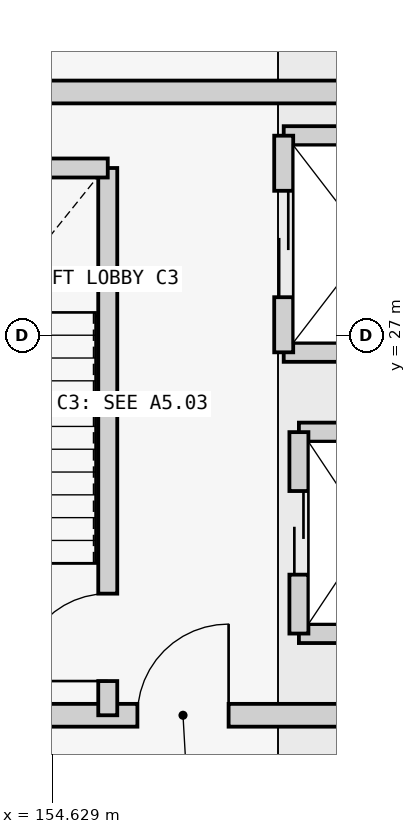
"""IFC4 building model, lengths in metres.
Left out: names, types, materials, properties, quantities, classifications, styles, units other than length and angle.
Written with IfcOpenShell. Run it as: python <this file> out.ifc"""

import sys

from ifc_helpers import new_model, si_unit, direction, frame, frame_2d, origin, place, context, subcontext, project, spatial, rectangle, extrude, element, fill, save


model = new_model("IFC4")
c1 = context("Model", 3, precision=1e-05, world=origin(), true_north=direction((0.0, 1.0)))
c2 = subcontext(c1, "Body", "Model", "MODEL_VIEW")
j1 = project(units=[si_unit("LENGTHUNIT", "METRE"), si_unit("PLANEANGLEUNIT", "RADIAN")], contexts=[c1])
p1 = place(None, origin())
s1 = spatial("IfcSite", under=j1, at=p1, CompositionType="ELEMENT")
p2 = place(p1, origin())
s2 = spatial("IfcBuilding", under=s1, at=p2, CompositionType="ELEMENT")
p3 = place(p2, frame((0.0, 0.0, 12.6)))
s3 = spatial("IfcBuildingStorey", under=s2, at=p3, CompositionType="ELEMENT", Elevation=12.6)
p4 = place(p3, frame((151.0, 22.0, 0.0), z_axis=(0.0, 0.0, 1.0), x_axis=(1.0, 0.0, 0.0)))
e1 = element("IfcWall", 1, at=p4, inside=s3, PredefinedType="SHEAR", context=c2, shape_type="SweptSolid", body=[
    extrude(rectangle(XDim=10.2, YDim=0.3, at=frame_2d((5.1, 0.0))), origin(), (0.0, 0.0, 1.0), 3.925),
])
p5 = place(p4, frame((4.75, 0.0, 0.0)))
e2 = element("IfcOpeningElement", 2, at=p5, cuts=e1, PredefinedType="OPENING", context=c2, shape_type="SweptSolid", body=[
    extrude(rectangle(XDim=1.2, YDim=2.15, at=frame_2d((0.6, 1.075))), frame((0.0, 0.16, 0.0), z_axis=(0.0, -1.0, 0.0), x_axis=(1.0, 0.0, 0.0)), (0.0, 0.0, 1.0), 0.32),
])
p6 = place(p3, frame((161.2, 30.2, 0.0), z_axis=(0.0, 0.0, 1.0), x_axis=(-1.0, 0.0, 0.0)))
e3 = element("IfcWall", 3, at=p6, inside=s3, PredefinedType="SHEAR", context=c2, shape_type="SweptSolid", body=[
    extrude(rectangle(XDim=10.2, YDim=0.3, at=frame_2d((5.1, 0.0))), origin(), (0.0, 0.0, 1.0), 3.925),
])
p7 = place(p3, frame((155.36, 22.0, 0.0), z_axis=(0.0, 0.0, 1.0), x_axis=(0.0, 1.0, 0.0)))
e4 = element("IfcWall", 4, at=p7, inside=s3, PredefinedType="SHEAR", context=c2, shape_type="SweptSolid", body=[
    extrude(rectangle(XDim=7.2, YDim=0.25, at=frame_2d((3.6, 0.0))), origin(), (0.0, 0.0, 1.0), 3.925),
])
p8 = place(p7, frame((0.45, 0.0, 0.0)))
e5 = element("IfcOpeningElement", 5, at=p8, cuts=e4, PredefinedType="OPENING", context=c2, shape_type="SweptSolid", body=[
    extrude(rectangle(XDim=1.15, YDim=2.15, at=frame_2d((0.575, 1.075))), frame((0.0, 0.135, 0.0), z_axis=(0.0, -1.0, 0.0), x_axis=(1.0, 0.0, 0.0)), (0.0, 0.0, 1.0), 0.27),
])
p9 = place(p3, frame((151.0, 29.2, 0.0), z_axis=(0.0, 0.0, 1.0), x_axis=(1.0, 0.0, 0.0)))
e6 = element("IfcWall", 6, at=p9, inside=s3, PredefinedType="SHEAR", context=c2, shape_type="SweptSolid", body=[
    extrude(rectangle(XDim=4.36, YDim=0.25, at=frame_2d((2.18, 0.0))), origin(), (0.0, 0.0, 1.0), 3.925),
])
for number, where, z_axis, x_axis in (
    (7, (157.875, 23.075, 0.0), (0.0, 0.0, 1.0), (1.0, 0.0, 0.0)),
    (8, (157.875, 25.725, 0.0), (0.0, 0.0, 1.0), (1.0, 0.0, 0.0)),
):
    element("IfcWall", number, at=place(p3, frame(where, z_axis=z_axis, x_axis=x_axis)), inside=s3, PredefinedType="SHEAR", context=c2, shape_type="SweptSolid", body=[
        extrude(rectangle(XDim=1.85, YDim=0.25, at=frame_2d((0.925, 0.0))), origin(), (0.0, 0.0, 1.0), 3.925),
    ])
p10 = place(p3, frame((157.875, 23.075, 0.0), z_axis=(0.0, 0.0, 1.0), x_axis=(0.0, 1.0, 0.0)))
e9 = element("IfcWall", 9, at=p10, inside=s3, PredefinedType="SHEAR", context=c2, shape_type="SweptSolid", body=[
    extrude(rectangle(XDim=2.65, YDim=0.25, at=frame_2d((1.325, 0.0))), origin(), (0.0, 0.0, 1.0), 3.925),
])
p11 = place(p10, frame((0.775, 0.0, 0.0)))
e10 = element("IfcOpeningElement", 10, at=p11, cuts=e9, PredefinedType="OPENING", context=c2, shape_type="SweptSolid", body=[
    extrude(rectangle(XDim=1.1, YDim=2.15, at=frame_2d((0.55, 1.075))), frame((0.0, 0.135, 0.0), z_axis=(0.0, -1.0, 0.0), x_axis=(1.0, 0.0, 0.0)), (0.0, 0.0, 1.0), 0.27),
])
for number, where, z_axis, x_axis in (
    (11, (157.675, 26.775, 0.0), (0.0, 0.0, 1.0), (1.0, 0.0, 0.0)),
    (12, (157.675, 29.625, 0.0), (0.0, 0.0, 1.0), (1.0, 0.0, 0.0)),
):
    element("IfcWall", number, at=place(p3, frame(where, z_axis=z_axis, x_axis=x_axis)), inside=s3, PredefinedType="SHEAR", context=c2, shape_type="SweptSolid", body=[
        extrude(rectangle(XDim=2.25, YDim=0.25, at=frame_2d((1.125, 0.0))), origin(), (0.0, 0.0, 1.0), 3.925),
    ])
p12 = place(p3, frame((157.675, 26.775, 0.0), z_axis=(0.0, 0.0, 1.0), x_axis=(0.0, 1.0, 0.0)))
e13 = element("IfcWall", 13, at=p12, inside=s3, PredefinedType="SHEAR", context=c2, shape_type="SweptSolid", body=[
    extrude(rectangle(XDim=2.85, YDim=0.25, at=frame_2d((1.425, 0.0))), origin(), (0.0, 0.0, 1.0), 3.925),
])
p13 = place(p12, frame((0.725, 0.0, 0.0)))
e14 = element("IfcOpeningElement", 14, at=p13, cuts=e13, PredefinedType="OPENING", context=c2, shape_type="SweptSolid", body=[
    extrude(rectangle(XDim=1.4, YDim=2.2, at=frame_2d((0.7, 1.1))), frame((0.0, 0.135, 0.0), z_axis=(0.0, -1.0, 0.0), x_axis=(1.0, 0.0, 0.0)), (0.0, 0.0, 1.0), 0.27),
])
p14 = place(p8, origin())
e15 = element("IfcDoor", 15, at=p14, inside=s3, OperationType="SINGLE_SWING_LEFT", PredefinedType="DOOR", context=c2, shape_type="SweptSolid", body=[
    extrude(rectangle(XDim=1.15, YDim=2.15, at=frame_2d((0.575, 1.075))), frame((0.0, 0.025, 0.0), z_axis=(0.0, -1.0, 0.0), x_axis=(1.0, 0.0, 0.0)), (0.0, 0.0, 1.0), 0.05),
])
fill(e5, e15)
p15 = place(p5, origin())
e16 = element("IfcDoor", 16, at=p15, inside=s3, OperationType="SINGLE_SWING_RIGHT", PredefinedType="DOOR", context=c2, shape_type="SweptSolid", body=[
    extrude(rectangle(XDim=1.2, YDim=2.15, at=frame_2d((0.6, 1.075))), frame((0.0, 0.025, 0.0), z_axis=(0.0, -1.0, 0.0), x_axis=(1.0, 0.0, 0.0)), (0.0, 0.0, 1.0), 0.05),
])
fill(e2, e16)
p16 = place(p11, origin())
e17 = element("IfcDoor", 17, at=p16, inside=s3, OperationType="DOUBLE_DOOR_SLIDING", PredefinedType="USERDEFINED", context=c2, shape_type="SweptSolid", body=[
    extrude(rectangle(XDim=1.1, YDim=2.15, at=frame_2d((0.55, 1.075))), frame((0.0, 0.025, 0.0), z_axis=(0.0, -1.0, 0.0), x_axis=(1.0, 0.0, 0.0)), (0.0, 0.0, 1.0), 0.05),
])
fill(e10, e17)
p17 = place(p13, origin())
e18 = element("IfcDoor", 18, at=p17, inside=s3, OperationType="DOUBLE_DOOR_SLIDING", PredefinedType="USERDEFINED", context=c2, shape_type="SweptSolid", body=[
    extrude(rectangle(XDim=1.4, YDim=2.2, at=frame_2d((0.7, 1.1))), frame((0.0, 0.025, 0.0), z_axis=(0.0, -1.0, 0.0), x_axis=(1.0, 0.0, 0.0)), (0.0, 0.0, 1.0), 0.05),
])
fill(e14, e18)
save(model, sys.argv[1])
